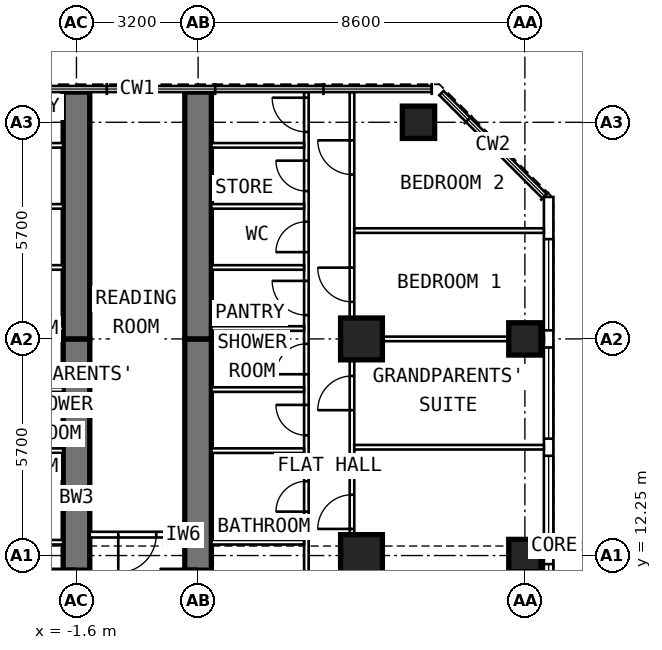
"""IFC4 building model, lengths in metres.
Left out: names, types, materials, properties, quantities, classifications, styles, units other than length and angle.
Written with IfcOpenShell. Run it as: python <this file> out.ifc"""

import sys

from ifc_helpers import new_model, si_unit, direction, frame, frame_2d, origin, origin_2d, place, context, subcontext, project, spatial, rectangle, extrude, element, fill, save


model = new_model("IFC4")
c1 = context("Model", 3, precision=1e-05, world=origin(), true_north=direction((0.0, 1.0)))
c2 = subcontext(c1, "Body", "Model", "MODEL_VIEW")
j1 = project(units=[si_unit("LENGTHUNIT", "METRE"), si_unit("PLANEANGLEUNIT", "RADIAN")], contexts=[c1])
p1 = place(None, origin())
s1 = spatial("IfcSite", under=j1, at=p1, CompositionType="ELEMENT")
p2 = place(p1, origin())
s2 = spatial("IfcBuilding", under=s1, at=p2, CompositionType="ELEMENT")
p3 = place(p2, frame((0.0, 0.0, 253.2)))
s3 = spatial("IfcBuildingStorey", under=s2, at=p3, CompositionType="ELEMENT", Elevation=253.2)
for number, where, z_axis, x_axis in (
    (1, (10.2, 12.25, 0.0), (0.0, 0.0, 1.0), (0.0, 1.0, 0.0)),
    (2, (10.2, 17.95, 0.0), (0.0, 0.0, 1.0), (0.0, 1.0, 0.0)),
    (3, (7.4, 23.65, 0.0), (0.0, 0.0, 1.0), (0.0, 1.0, 0.0)),
):
    element("IfcColumn", number, at=place(p3, frame(where, z_axis=z_axis, x_axis=x_axis)), inside=s3, PredefinedType="COLUMN", context=c2, shape_type="SweptSolid", body=[
        extrude(rectangle(XDim=0.85, YDim=0.85, at=origin_2d()), origin(), (0.0, 0.0, 1.0), 3.6),
    ])
for number, where, z_axis, x_axis in (
    (4, (5.9, 12.25, 0.0), (0.0, 0.0, 1.0), (0.0, 1.0, 0.0)),
    (5, (5.9, 17.95, 0.0), (0.0, 0.0, 1.0), (0.0, 1.0, 0.0)),
):
    element("IfcColumn", number, at=place(p3, frame(where, z_axis=z_axis, x_axis=x_axis)), inside=s3, PredefinedType="COLUMN", context=c2, shape_type="SweptSolid", body=[
        extrude(rectangle(XDim=1.1, YDim=1.1, at=origin_2d()), origin(), (0.0, 0.0, 1.0), 3.6),
    ])
p4 = place(p3, frame((-1.6, 9.6, 0.0), z_axis=(0.0, 0.0, 1.0), x_axis=(0.0, 1.0, 0.0)))
e6 = element("IfcWall", 6, at=p4, inside=s3, PredefinedType="SHEAR", context=c2, shape_type="SweptSolid", body=[
    extrude(rectangle(XDim=8.35, YDim=0.7, at=frame_2d((4.175, 0.0))), origin(), (0.0, 0.0, 1.0), 3.6),
])
p5 = place(p4, frame((1.3, 0.0, 0.0)))
e7 = element("IfcOpeningElement", 7, at=p5, cuts=e6, PredefinedType="OPENING", context=c2, shape_type="SweptSolid", body=[
    extrude(rectangle(XDim=1.0, YDim=2.1, at=frame_2d((0.5, 1.05))), frame((0.0, 0.362, 0.0), z_axis=(0.0, -1.0, 0.0), x_axis=(1.0, 0.0, 0.0)), (0.0, 0.0, 1.0), 0.724),
])
p6 = place(p3, frame((-1.6, 17.95, 0.0), z_axis=(0.0, 0.0, 1.0), x_axis=(0.0, 1.0, 0.0)))
e8 = element("IfcWall", 8, at=p6, inside=s3, PredefinedType="SHEAR", context=c2, shape_type="SweptSolid", body=[
    extrude(rectangle(XDim=6.495, YDim=0.7, at=frame_2d((3.248, 0.0))), origin(), (0.0, 0.0, 1.0), 3.6),
])
p7 = place(p3, frame((1.6, 9.6, 0.0), z_axis=(0.0, 0.0, 1.0), x_axis=(0.0, 1.0, 0.0)))
e9 = element("IfcWall", 9, at=p7, inside=s3, PredefinedType="SHEAR", context=c2, shape_type="SweptSolid", body=[
    extrude(rectangle(XDim=8.35, YDim=0.7, at=frame_2d((4.175, 0.0))), origin(), (0.0, 0.0, 1.0), 3.6),
])
p8 = place(p7, frame((1.3, 0.0, 0.0)))
e10 = element("IfcOpeningElement", 10, at=p8, cuts=e9, PredefinedType="OPENING", context=c2, shape_type="SweptSolid", body=[
    extrude(rectangle(XDim=1.0, YDim=2.1, at=frame_2d((0.5, 1.05))), frame((0.0, 0.362, 0.0), z_axis=(0.0, -1.0, 0.0), x_axis=(1.0, 0.0, 0.0)), (0.0, 0.0, 1.0), 0.724),
])
p9 = place(p3, frame((1.6, 17.95, 0.0), z_axis=(0.0, 0.0, 1.0), x_axis=(0.0, 1.0, 0.0)))
e11 = element("IfcWall", 11, at=p9, inside=s3, PredefinedType="SHEAR", context=c2, shape_type="SweptSolid", body=[
    extrude(rectangle(XDim=6.495, YDim=0.7, at=frame_2d((3.248, 0.0))), origin(), (0.0, 0.0, 1.0), 3.6),
])
p10 = place(p3, frame((10.825, 6.409, 0.0), z_axis=(0.0, 0.0, 1.0), x_axis=(0.0, 1.0, 0.0)))
e12 = element("IfcWall", 12, at=p10, inside=s3, PredefinedType="SOLIDWALL", context=c2, shape_type="SweptSolid", body=[
    extrude(rectangle(XDim=15.276, YDim=0.25, at=frame_2d((7.638, 0.0))), origin(), (0.0, 0.0, 1.0), 3.35),
])
p11 = place(p10, frame((0.366, 0.0, 0.8)))
e13 = element("IfcOpeningElement", 13, at=p11, cuts=e12, PredefinedType="OPENING", context=c2, shape_type="SweptSolid", body=[
    extrude(rectangle(XDim=2.4, YDim=1.8, at=frame_2d((1.2, 0.9))), frame((0.0, 0.137, 0.0), z_axis=(0.0, -1.0, 0.0), x_axis=(1.0, 0.0, 0.0)), (0.0, 0.0, 1.0), 0.274),
])
p12 = place(p10, frame((3.216, 0.0, 0.8)))
e14 = element("IfcOpeningElement", 14, at=p12, cuts=e12, PredefinedType="OPENING", context=c2, shape_type="SweptSolid", body=[
    extrude(rectangle(XDim=2.4, YDim=1.8, at=frame_2d((1.2, 0.9))), frame((0.0, 0.137, 0.0), z_axis=(0.0, -1.0, 0.0), x_axis=(1.0, 0.0, 0.0)), (0.0, 0.0, 1.0), 0.274),
])
p13 = place(p10, frame((6.066, 0.0, 0.8)))
e15 = element("IfcOpeningElement", 15, at=p13, cuts=e12, PredefinedType="OPENING", context=c2, shape_type="SweptSolid", body=[
    extrude(rectangle(XDim=2.4, YDim=1.8, at=frame_2d((1.2, 0.9))), frame((0.0, 0.137, 0.0), z_axis=(0.0, -1.0, 0.0), x_axis=(1.0, 0.0, 0.0)), (0.0, 0.0, 1.0), 0.274),
])
p14 = place(p10, frame((8.916, 0.0, 0.8)))
e16 = element("IfcOpeningElement", 16, at=p14, cuts=e12, PredefinedType="OPENING", context=c2, shape_type="SweptSolid", body=[
    extrude(rectangle(XDim=2.4, YDim=1.8, at=frame_2d((1.2, 0.9))), frame((0.0, 0.137, 0.0), z_axis=(0.0, -1.0, 0.0), x_axis=(1.0, 0.0, 0.0)), (0.0, 0.0, 1.0), 0.274),
])
p15 = place(p10, frame((11.766, 0.0, 0.8)))
e17 = element("IfcOpeningElement", 17, at=p15, cuts=e12, PredefinedType="OPENING", context=c2, shape_type="SweptSolid", body=[
    extrude(rectangle(XDim=2.4, YDim=1.8, at=frame_2d((1.2, 0.9))), frame((0.0, 0.137, 0.0), z_axis=(0.0, -1.0, 0.0), x_axis=(1.0, 0.0, 0.0)), (0.0, 0.0, 1.0), 0.274),
])
p16 = place(p3, frame((-1.95, 12.6, 0.0), z_axis=(0.0, 0.0, 1.0), x_axis=(-1.0, 0.0, 0.0)))
e18 = element("IfcWall", 18, at=p16, inside=s3, PredefinedType="PARTITIONING", context=c2, shape_type="SweptSolid", body=[
    extrude(rectangle(XDim=2.44, YDim=0.12, at=frame_2d((1.22, 0.0))), origin(), (0.0, 0.0, 1.0), 2.45),
])
for number, where, z_axis, x_axis in (
    (19, (-1.95, 15.01, 0.0), (0.0, 0.0, 1.0), (-1.0, 0.0, 0.0)),
    (20, (-1.95, 16.617, 0.0), (0.0, 0.0, 1.0), (-1.0, 0.0, 0.0)),
):
    element("IfcWall", number, at=place(p3, frame(where, z_axis=z_axis, x_axis=x_axis)), inside=s3, PredefinedType="PARTITIONING", context=c2, shape_type="SweptSolid", body=[
        extrude(rectangle(XDim=2.44, YDim=0.12, at=frame_2d((1.22, 0.0))), origin(), (0.0, 0.0, 1.0), 3.35),
    ])
p17 = place(p3, frame((-1.95, 18.223, 0.0), z_axis=(0.0, 0.0, 1.0), x_axis=(-1.0, 0.0, 0.0)))
e21 = element("IfcWall", 21, at=p17, inside=s3, PredefinedType="PARTITIONING", context=c2, shape_type="SweptSolid", body=[
    extrude(rectangle(XDim=2.44, YDim=0.12, at=frame_2d((1.22, 0.0))), origin(), (0.0, 0.0, 1.0), 2.45),
])
for number, where, z_axis, x_axis in (
    (22, (-1.95, 19.83, 0.0), (0.0, 0.0, 1.0), (-1.0, 0.0, 0.0)),
    (23, (-1.95, 21.437, 0.0), (0.0, 0.0, 1.0), (-1.0, 0.0, 0.0)),
    (24, (-1.95, 23.043, 0.0), (0.0, 0.0, 1.0), (-1.0, 0.0, 0.0)),
):
    element("IfcWall", number, at=place(p3, frame(where, z_axis=z_axis, x_axis=x_axis)), inside=s3, PredefinedType="PARTITIONING", context=c2, shape_type="SweptSolid", body=[
        extrude(rectangle(XDim=2.44, YDim=0.12, at=frame_2d((1.22, 0.0))), origin(), (0.0, 0.0, 1.0), 3.35),
    ])
p18 = place(p3, frame((4.45, 9.9, 0.0), z_axis=(0.0, 0.0, 1.0), x_axis=(0.0, 1.0, 0.0)))
e25 = element("IfcWall", 25, at=p18, inside=s3, PredefinedType="PARTITIONING", context=c2, shape_type="SweptSolid", body=[
    extrude(rectangle(XDim=14.545, YDim=0.12, at=frame_2d((7.272, 0.0))), origin(), (0.0, 0.0, 1.0), 3.35),
])
p19 = place(p18, frame((0.95, 0.0, 0.0)))
e26 = element("IfcOpeningElement", 26, at=p19, cuts=e25, PredefinedType="OPENING", context=c2, shape_type="SweptSolid", body=[
    extrude(rectangle(XDim=0.9, YDim=2.1, at=frame_2d((0.45, 1.05))), frame((0.0, 0.072, 0.0), z_axis=(0.0, -1.0, 0.0), x_axis=(1.0, 0.0, 0.0)), (0.0, 0.0, 1.0), 0.144),
])
p20 = place(p18, frame((3.505, 0.0, 0.0)))
e27 = element("IfcOpeningElement", 27, at=p20, cuts=e25, PredefinedType="OPENING", context=c2, shape_type="SweptSolid", body=[
    extrude(rectangle(XDim=0.8, YDim=2.1, at=frame_2d((0.4, 1.05))), frame((0.0, 0.072, 0.0), z_axis=(0.0, -1.0, 0.0), x_axis=(1.0, 0.0, 0.0)), (0.0, 0.0, 1.0), 0.144),
])
p21 = place(p18, frame((5.513, 0.0, 0.0)))
e28 = element("IfcOpeningElement", 28, at=p21, cuts=e25, PredefinedType="OPENING", context=c2, shape_type="SweptSolid", body=[
    extrude(rectangle(XDim=0.8, YDim=2.1, at=frame_2d((0.4, 1.05))), frame((0.0, 0.072, 0.0), z_axis=(0.0, -1.0, 0.0), x_axis=(1.0, 0.0, 0.0)), (0.0, 0.0, 1.0), 0.144),
])
p22 = place(p18, frame((7.12, 0.0, 0.0)))
e29 = element("IfcOpeningElement", 29, at=p22, cuts=e25, PredefinedType="OPENING", context=c2, shape_type="SweptSolid", body=[
    extrude(rectangle(XDim=0.8, YDim=2.1, at=frame_2d((0.4, 1.05))), frame((0.0, 0.072, 0.0), z_axis=(0.0, -1.0, 0.0), x_axis=(1.0, 0.0, 0.0)), (0.0, 0.0, 1.0), 0.144),
])
p23 = place(p18, frame((8.677, 0.0, 0.0)))
e30 = element("IfcOpeningElement", 30, at=p23, cuts=e25, PredefinedType="OPENING", context=c2, shape_type="SweptSolid", body=[
    extrude(rectangle(XDim=0.9, YDim=2.1, at=frame_2d((0.45, 1.05))), frame((0.0, 0.072, 0.0), z_axis=(0.0, -1.0, 0.0), x_axis=(1.0, 0.0, 0.0)), (0.0, 0.0, 1.0), 0.144),
])
p24 = place(p18, frame((10.333, 0.0, 0.0)))
e31 = element("IfcOpeningElement", 31, at=p24, cuts=e25, PredefinedType="OPENING", context=c2, shape_type="SweptSolid", body=[
    extrude(rectangle(XDim=0.8, YDim=2.1, at=frame_2d((0.4, 1.05))), frame((0.0, 0.072, 0.0), z_axis=(0.0, -1.0, 0.0), x_axis=(1.0, 0.0, 0.0)), (0.0, 0.0, 1.0), 0.144),
])
p25 = place(p18, frame((11.94, 0.0, 0.0)))
e32 = element("IfcOpeningElement", 32, at=p25, cuts=e25, PredefinedType="OPENING", context=c2, shape_type="SweptSolid", body=[
    extrude(rectangle(XDim=0.8, YDim=2.1, at=frame_2d((0.4, 1.05))), frame((0.0, 0.072, 0.0), z_axis=(0.0, -1.0, 0.0), x_axis=(1.0, 0.0, 0.0)), (0.0, 0.0, 1.0), 0.144),
])
p26 = place(p18, frame((13.497, 0.0, 0.0)))
e33 = element("IfcOpeningElement", 33, at=p26, cuts=e25, PredefinedType="OPENING", context=c2, shape_type="SweptSolid", body=[
    extrude(rectangle(XDim=0.9, YDim=2.1, at=frame_2d((0.45, 1.05))), frame((0.0, 0.072, 0.0), z_axis=(0.0, -1.0, 0.0), x_axis=(1.0, 0.0, 0.0)), (0.0, 0.0, 1.0), 0.144),
])
p27 = place(p3, frame((5.65, 9.6, 0.0), z_axis=(0.0, 0.0, 1.0), x_axis=(0.0, 1.0, 0.0)))
e34 = element("IfcWall", 34, at=p27, inside=s3, PredefinedType="PARTITIONING", context=c2, shape_type="SweptSolid", body=[
    extrude(rectangle(XDim=14.845, YDim=0.12, at=frame_2d((7.422, 0.0))), origin(), (0.0, 0.0, 1.0), 3.35),
])
p28 = place(p27, frame((3.35, 0.0, 0.0)))
e35 = element("IfcOpeningElement", 35, at=p28, cuts=e34, PredefinedType="OPENING", context=c2, shape_type="SweptSolid", body=[
    extrude(rectangle(XDim=0.9, YDim=2.1, at=frame_2d((0.45, 1.05))), frame((0.0, 0.072, 0.0), z_axis=(0.0, -1.0, 0.0), x_axis=(1.0, 0.0, 0.0)), (0.0, 0.0, 1.0), 0.144),
])
p29 = place(p27, frame((6.475, 0.0, 0.0)))
e36 = element("IfcOpeningElement", 36, at=p29, cuts=e34, PredefinedType="OPENING", context=c2, shape_type="SweptSolid", body=[
    extrude(rectangle(XDim=0.9, YDim=2.1, at=frame_2d((0.45, 1.05))), frame((0.0, 0.072, 0.0), z_axis=(0.0, -1.0, 0.0), x_axis=(1.0, 0.0, 0.0)), (0.0, 0.0, 1.0), 0.144),
])
p30 = place(p27, frame((9.325, 0.0, 0.0)))
e37 = element("IfcOpeningElement", 37, at=p30, cuts=e34, PredefinedType="OPENING", context=c2, shape_type="SweptSolid", body=[
    extrude(rectangle(XDim=0.9, YDim=2.1, at=frame_2d((0.45, 1.05))), frame((0.0, 0.072, 0.0), z_axis=(0.0, -1.0, 0.0), x_axis=(1.0, 0.0, 0.0)), (0.0, 0.0, 1.0), 0.144),
])
p31 = place(p27, frame((12.675, 0.0, 0.0)))
e38 = element("IfcOpeningElement", 38, at=p31, cuts=e34, PredefinedType="OPENING", context=c2, shape_type="SweptSolid", body=[
    extrude(rectangle(XDim=0.9, YDim=2.1, at=frame_2d((0.45, 1.05))), frame((0.0, 0.072, 0.0), z_axis=(0.0, -1.0, 0.0), x_axis=(1.0, 0.0, 0.0)), (0.0, 0.0, 1.0), 0.144),
])
p32 = place(p3, frame((5.71, 15.1, 0.0), z_axis=(0.0, 0.0, 1.0), x_axis=(1.0, 0.0, 0.0)))
e39 = element("IfcWall", 39, at=p32, inside=s3, PredefinedType="PARTITIONING", context=c2, shape_type="SweptSolid", body=[
    extrude(rectangle(XDim=4.99, YDim=0.12, at=frame_2d((2.495, 0.0))), origin(), (0.0, 0.0, 1.0), 3.35),
])
p33 = place(p3, frame((5.71, 17.95, 0.0), z_axis=(0.0, 0.0, 1.0), x_axis=(1.0, 0.0, 0.0)))
e40 = element("IfcWall", 40, at=p33, inside=s3, PredefinedType="PARTITIONING", context=c2, shape_type="SweptSolid", body=[
    extrude(rectangle(XDim=4.99, YDim=0.12, at=frame_2d((2.495, 0.0))), origin(), (0.0, 0.0, 1.0), 2.45),
])
p34 = place(p3, frame((5.71, 20.8, 0.0), z_axis=(0.0, 0.0, 1.0), x_axis=(1.0, 0.0, 0.0)))
e41 = element("IfcWall", 41, at=p34, inside=s3, PredefinedType="PARTITIONING", context=c2, shape_type="SweptSolid", body=[
    extrude(rectangle(XDim=4.99, YDim=0.12, at=frame_2d((2.495, 0.0))), origin(), (0.0, 0.0, 1.0), 3.35),
])
p35 = place(p3, frame((1.95, 12.6, 0.0), z_axis=(0.0, 0.0, 1.0), x_axis=(1.0, 0.0, 0.0)))
e42 = element("IfcWall", 42, at=p35, inside=s3, PredefinedType="PARTITIONING", context=c2, shape_type="SweptSolid", body=[
    extrude(rectangle(XDim=2.44, YDim=0.12, at=frame_2d((1.22, 0.0))), origin(), (0.0, 0.0, 1.0), 2.45),
])
for number, where, z_axis, x_axis in (
    (43, (1.95, 15.01, 0.0), (0.0, 0.0, 1.0), (1.0, 0.0, 0.0)),
    (44, (1.95, 16.617, 0.0), (0.0, 0.0, 1.0), (1.0, 0.0, 0.0)),
):
    element("IfcWall", number, at=place(p3, frame(where, z_axis=z_axis, x_axis=x_axis)), inside=s3, PredefinedType="PARTITIONING", context=c2, shape_type="SweptSolid", body=[
        extrude(rectangle(XDim=2.44, YDim=0.12, at=frame_2d((1.22, 0.0))), origin(), (0.0, 0.0, 1.0), 3.35),
    ])
p36 = place(p3, frame((1.95, 18.223, 0.0), z_axis=(0.0, 0.0, 1.0), x_axis=(1.0, 0.0, 0.0)))
e45 = element("IfcWall", 45, at=p36, inside=s3, PredefinedType="PARTITIONING", context=c2, shape_type="SweptSolid", body=[
    extrude(rectangle(XDim=2.44, YDim=0.12, at=frame_2d((1.22, 0.0))), origin(), (0.0, 0.0, 1.0), 2.45),
])
for number, where, z_axis, x_axis in (
    (46, (1.95, 19.83, 0.0), (0.0, 0.0, 1.0), (1.0, 0.0, 0.0)),
    (47, (1.95, 21.437, 0.0), (0.0, 0.0, 1.0), (1.0, 0.0, 0.0)),
    (48, (1.95, 23.043, 0.0), (0.0, 0.0, 1.0), (1.0, 0.0, 0.0)),
):
    element("IfcWall", number, at=place(p3, frame(where, z_axis=z_axis, x_axis=x_axis)), inside=s3, PredefinedType="PARTITIONING", context=c2, shape_type="SweptSolid", body=[
        extrude(rectangle(XDim=2.44, YDim=0.12, at=frame_2d((1.22, 0.0))), origin(), (0.0, 0.0, 1.0), 3.35),
    ])
p37 = place(p3, frame((1.25, 12.8, 0.0), z_axis=(0.0, 0.0, 1.0), x_axis=(-1.0, 0.0, 0.0)))
e49 = element("IfcWall", 49, at=p37, inside=s3, PredefinedType="PARTITIONING", context=c2, shape_type="SweptSolid", body=[
    extrude(rectangle(XDim=2.5, YDim=0.15, at=frame_2d((1.25, 0.0))), origin(), (0.0, 0.0, 1.0), 3.35),
])
p38 = place(p37, frame((0.75, 0.0, 0.0)))
e50 = element("IfcOpeningElement", 50, at=p38, cuts=e49, PredefinedType="OPENING", context=c2, shape_type="SweptSolid", body=[
    extrude(rectangle(XDim=1.0, YDim=2.1, at=frame_2d((0.5, 1.05))), frame((0.0, 0.087, 0.0), z_axis=(0.0, -1.0, 0.0), x_axis=(1.0, 0.0, 0.0)), (0.0, 0.0, 1.0), 0.174),
])
p39 = place(p12, origin())
e51 = element("IfcWindow", 51, at=p39, inside=s3, PartitioningType="SINGLE_PANEL", PredefinedType="WINDOW", context=c2, shape_type="SweptSolid", body=[
    extrude(rectangle(XDim=2.4, YDim=1.8, at=frame_2d((1.2, 0.9))), frame((0.0, 0.03, 0.0), z_axis=(0.0, -1.0, 0.0), x_axis=(1.0, 0.0, 0.0)), (0.0, 0.0, 1.0), 0.06),
])
fill(e14, e51)
p40 = place(p13, origin())
e52 = element("IfcWindow", 52, at=p40, inside=s3, PartitioningType="SINGLE_PANEL", PredefinedType="WINDOW", context=c2, shape_type="SweptSolid", body=[
    extrude(rectangle(XDim=2.4, YDim=1.8, at=frame_2d((1.2, 0.9))), frame((0.0, 0.03, 0.0), z_axis=(0.0, -1.0, 0.0), x_axis=(1.0, 0.0, 0.0)), (0.0, 0.0, 1.0), 0.06),
])
fill(e15, e52)
p41 = place(p14, origin())
e53 = element("IfcWindow", 53, at=p41, inside=s3, PartitioningType="SINGLE_PANEL", PredefinedType="WINDOW", context=c2, shape_type="SweptSolid", body=[
    extrude(rectangle(XDim=2.4, YDim=1.8, at=frame_2d((1.2, 0.9))), frame((0.0, 0.03, 0.0), z_axis=(0.0, -1.0, 0.0), x_axis=(1.0, 0.0, 0.0)), (0.0, 0.0, 1.0), 0.06),
])
fill(e16, e53)
p42 = place(p15, origin())
e54 = element("IfcWindow", 54, at=p42, inside=s3, PartitioningType="SINGLE_PANEL", PredefinedType="WINDOW", context=c2, shape_type="SweptSolid", body=[
    extrude(rectangle(XDim=2.4, YDim=1.8, at=frame_2d((1.2, 0.9))), frame((0.0, 0.03, 0.0), z_axis=(0.0, -1.0, 0.0), x_axis=(1.0, 0.0, 0.0)), (0.0, 0.0, 1.0), 0.06),
])
fill(e17, e54)
p43 = place(p5, origin())
e55 = element("IfcDoor", 55, at=p43, inside=s3, OperationType="SINGLE_SWING_RIGHT", PredefinedType="DOOR", context=c2, shape_type="SweptSolid", body=[
    extrude(rectangle(XDim=1.0, YDim=2.1, at=frame_2d((0.5, 1.05))), frame((0.0, 0.1, 0.0), z_axis=(0.0, -1.0, 0.0), x_axis=(1.0, 0.0, 0.0)), (0.0, 0.0, 1.0), 0.2),
])
fill(e7, e55)
p44 = place(p8, origin())
e56 = element("IfcDoor", 56, at=p44, inside=s3, OperationType="SINGLE_SWING_RIGHT", PredefinedType="DOOR", context=c2, shape_type="SweptSolid", body=[
    extrude(rectangle(XDim=1.0, YDim=2.1, at=frame_2d((0.5, 1.05))), frame((0.0, 0.1, 0.0), z_axis=(0.0, -1.0, 0.0), x_axis=(1.0, 0.0, 0.0)), (0.0, 0.0, 1.0), 0.2),
])
fill(e10, e56)
p45 = place(p28, origin())
e57 = element("IfcDoor", 57, at=p45, inside=s3, OperationType="SINGLE_SWING_LEFT", PredefinedType="DOOR", context=c2, shape_type="SweptSolid", body=[
    extrude(rectangle(XDim=0.9, YDim=2.1, at=frame_2d((0.45, 1.05))), frame((0.0, 0.025, 0.0), z_axis=(0.0, -1.0, 0.0), x_axis=(1.0, 0.0, 0.0)), (0.0, 0.0, 1.0), 0.05),
])
fill(e35, e57)
p46 = place(p29, origin())
e58 = element("IfcDoor", 58, at=p46, inside=s3, OperationType="SINGLE_SWING_LEFT", PredefinedType="DOOR", context=c2, shape_type="SweptSolid", body=[
    extrude(rectangle(XDim=0.9, YDim=2.1, at=frame_2d((0.45, 1.05))), frame((0.0, 0.025, 0.0), z_axis=(0.0, -1.0, 0.0), x_axis=(1.0, 0.0, 0.0)), (0.0, 0.0, 1.0), 0.05),
])
fill(e36, e58)
p47 = place(p30, origin())
e59 = element("IfcDoor", 59, at=p47, inside=s3, OperationType="SINGLE_SWING_RIGHT", PredefinedType="DOOR", context=c2, shape_type="SweptSolid", body=[
    extrude(rectangle(XDim=0.9, YDim=2.1, at=frame_2d((0.45, 1.05))), frame((0.0, 0.025, 0.0), z_axis=(0.0, -1.0, 0.0), x_axis=(1.0, 0.0, 0.0)), (0.0, 0.0, 1.0), 0.05),
])
fill(e37, e59)
p48 = place(p31, origin())
e60 = element("IfcDoor", 60, at=p48, inside=s3, OperationType="SINGLE_SWING_RIGHT", PredefinedType="DOOR", context=c2, shape_type="SweptSolid", body=[
    extrude(rectangle(XDim=0.9, YDim=2.1, at=frame_2d((0.45, 1.05))), frame((0.0, 0.025, 0.0), z_axis=(0.0, -1.0, 0.0), x_axis=(1.0, 0.0, 0.0)), (0.0, 0.0, 1.0), 0.05),
])
fill(e38, e60)
p49 = place(p20, origin())
e61 = element("IfcDoor", 61, at=p49, inside=s3, OperationType="SINGLE_SWING_LEFT", PredefinedType="DOOR", context=c2, shape_type="SweptSolid", body=[
    extrude(rectangle(XDim=0.8, YDim=2.1, at=frame_2d((0.4, 1.05))), frame((0.0, 0.025, 0.0), z_axis=(0.0, -1.0, 0.0), x_axis=(1.0, 0.0, 0.0)), (0.0, 0.0, 1.0), 0.05),
])
fill(e27, e61)
p50 = place(p21, origin())
e62 = element("IfcDoor", 62, at=p50, inside=s3, OperationType="SINGLE_SWING_RIGHT", PredefinedType="DOOR", context=c2, shape_type="SweptSolid", body=[
    extrude(rectangle(XDim=0.8, YDim=2.1, at=frame_2d((0.4, 1.05))), frame((0.0, 0.025, 0.0), z_axis=(0.0, -1.0, 0.0), x_axis=(1.0, 0.0, 0.0)), (0.0, 0.0, 1.0), 0.05),
])
fill(e28, e62)
p51 = place(p22, origin())
e63 = element("IfcDoor", 63, at=p51, inside=s3, OperationType="SINGLE_SWING_LEFT", PredefinedType="DOOR", context=c2, shape_type="SweptSolid", body=[
    extrude(rectangle(XDim=0.8, YDim=2.1, at=frame_2d((0.4, 1.05))), frame((0.0, 0.025, 0.0), z_axis=(0.0, -1.0, 0.0), x_axis=(1.0, 0.0, 0.0)), (0.0, 0.0, 1.0), 0.05),
])
fill(e29, e63)
p52 = place(p23, origin())
e64 = element("IfcDoor", 64, at=p52, inside=s3, OperationType="SINGLE_SWING_RIGHT", PredefinedType="DOOR", context=c2, shape_type="SweptSolid", body=[
    extrude(rectangle(XDim=0.9, YDim=2.1, at=frame_2d((0.45, 1.05))), frame((0.0, 0.025, 0.0), z_axis=(0.0, -1.0, 0.0), x_axis=(1.0, 0.0, 0.0)), (0.0, 0.0, 1.0), 0.05),
])
fill(e30, e64)
p53 = place(p24, origin())
e65 = element("IfcDoor", 65, at=p53, inside=s3, OperationType="SINGLE_SWING_LEFT", PredefinedType="DOOR", context=c2, shape_type="SweptSolid", body=[
    extrude(rectangle(XDim=0.8, YDim=2.1, at=frame_2d((0.4, 1.05))), frame((0.0, 0.025, 0.0), z_axis=(0.0, -1.0, 0.0), x_axis=(1.0, 0.0, 0.0)), (0.0, 0.0, 1.0), 0.05),
])
fill(e31, e65)
p54 = place(p25, origin())
e66 = element("IfcDoor", 66, at=p54, inside=s3, OperationType="SINGLE_SWING_RIGHT", PredefinedType="DOOR", context=c2, shape_type="SweptSolid", body=[
    extrude(rectangle(XDim=0.8, YDim=2.1, at=frame_2d((0.4, 1.05))), frame((0.0, 0.025, 0.0), z_axis=(0.0, -1.0, 0.0), x_axis=(1.0, 0.0, 0.0)), (0.0, 0.0, 1.0), 0.05),
])
fill(e32, e66)
p55 = place(p26, origin())
e67 = element("IfcDoor", 67, at=p55, inside=s3, OperationType="SINGLE_SWING_RIGHT", PredefinedType="DOOR", context=c2, shape_type="SweptSolid", body=[
    extrude(rectangle(XDim=0.9, YDim=2.1, at=frame_2d((0.45, 1.05))), frame((0.0, 0.025, 0.0), z_axis=(0.0, -1.0, 0.0), x_axis=(1.0, 0.0, 0.0)), (0.0, 0.0, 1.0), 0.05),
])
fill(e33, e67)
p56 = place(p38, origin())
e68 = element("IfcDoor", 68, at=p56, inside=s3, OperationType="SINGLE_SWING_RIGHT", PredefinedType="DOOR", context=c2, shape_type="SweptSolid", body=[
    extrude(rectangle(XDim=1.0, YDim=2.1, at=frame_2d((0.5, 1.05))), frame((0.0, 0.025, 0.0), z_axis=(0.0, -1.0, 0.0), x_axis=(1.0, 0.0, 0.0)), (0.0, 0.0, 1.0), 0.05),
])
fill(e50, e68)
save(model, sys.argv[1])
